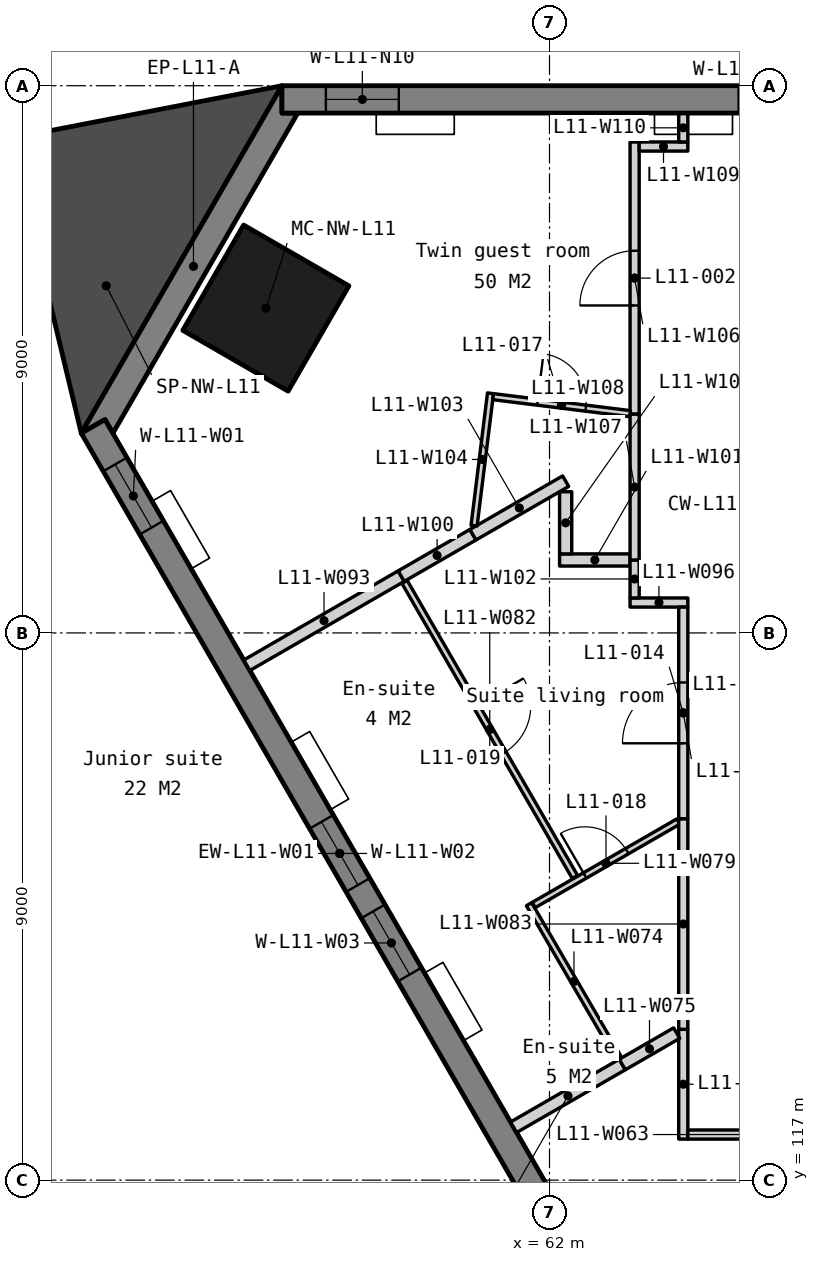
"""IFC4 building model, lengths in metres.
Left out: names, types, materials, properties, quantities, classifications, styles, units other than length and angle.
Written with IfcOpenShell. Run it as: python <this file> out.ifc"""

import sys

from ifc_helpers import new_model, si_unit, direction, frame, frame_2d, origin, origin_2d, place, context, subcontext, project, spatial, polyline, rectangle, outline, extrude, element, fill, save


model = new_model("IFC4")
c1 = context("Model", 3, precision=1e-05, world=origin(), true_north=direction((0.0, 1.0)))
c2 = subcontext(c1, "Body", "Model", "MODEL_VIEW")
j1 = project(units=[si_unit("LENGTHUNIT", "METRE"), si_unit("PLANEANGLEUNIT", "RADIAN")], contexts=[c1])
p1 = place(None, origin())
s1 = spatial("IfcSite", under=j1, at=p1, CompositionType="ELEMENT")
p2 = place(p1, origin())
s2 = spatial("IfcBuilding", under=s1, at=p2, CompositionType="ELEMENT")
p3 = place(p2, frame((0.0, 0.0, 52.5)))
s3 = spatial("IfcBuildingStorey", under=s2, at=p3, CompositionType="ELEMENT", Elevation=52.5)
p4 = place(p3, frame((57.336, 131.342, 0.0), z_axis=(0.0, 0.0, 1.0), x_axis=(-0.5, -0.866025403784, 0.0)))
e1 = element("IfcColumn", 1, at=p4, inside=s3, PredefinedType="COLUMN", context=c2, shape_type="SweptSolid", body=[
    extrude(rectangle(XDim=2.0, YDim=2.0, at=origin_2d()), origin(), (0.0, 0.0, 1.0), 3.5),
])
p5 = place(p3, frame((0.0, 0.0, -0.15)))
e2 = element("IfcWall", 2, at=p5, inside=s3, PredefinedType="SOLIDWALL", context=c2, shape_type="SweptSolid", body=[
    extrude(outline(polyline([(57.6, 135.0), (57.6, 134.55), (57.86, 134.55), (54.82, 129.284), (54.69, 129.509), (54.3, 129.284), (57.6, 135.0)])), origin(), (0.0, 0.0, 1.0), 3.5),
])
p6 = place(p3, frame((102.4, 134.775, -0.15), z_axis=(0.0, 0.0, 1.0), x_axis=(-1.0, 0.0, 0.0)))
e3 = element("IfcWall", 3, at=p6, inside=s3, PredefinedType="SOLIDWALL", context=c2, shape_type="SweptSolid", body=[
    extrude(outline(polyline([(44.8, 0.0), (44.8, 3.5), (0.0, 3.5), (0.0, 0.0), (44.8, 0.0)])), frame((0.0, 0.225, 0.0), z_axis=(0.0, -1.0, 0.0), x_axis=(1.0, 0.0, 0.0)), (0.0, 0.0, 1.0), 0.45),
])
p7 = place(p6, frame((0.722, 0.0, 1.05)))
e4 = element("IfcOpeningElement", 4, at=p7, cuts=e3, PredefinedType="OPENING", context=c2, shape_type="SweptSolid", body=[
    extrude(rectangle(XDim=1.2, YDim=1.5, at=frame_2d((0.6, 0.75))), frame((0.0, 0.235, 0.0), z_axis=(0.0, -1.0, 0.0), x_axis=(1.0, 0.0, 0.0)), (0.0, 0.0, 1.0), 0.47),
])
p8 = place(p6, frame((7.51, 0.0, 1.05)))
e5 = element("IfcOpeningElement", 5, at=p8, cuts=e3, PredefinedType="OPENING", context=c2, shape_type="SweptSolid", body=[
    extrude(rectangle(XDim=1.2, YDim=1.5, at=frame_2d((0.6, 0.75))), frame((0.0, 0.235, 0.0), z_axis=(0.0, -1.0, 0.0), x_axis=(1.0, 0.0, 0.0)), (0.0, 0.0, 1.0), 0.47),
])
p9 = place(p6, frame((9.21, 0.0, 1.05)))
e6 = element("IfcOpeningElement", 6, at=p9, cuts=e3, PredefinedType="OPENING", context=c2, shape_type="SweptSolid", body=[
    extrude(rectangle(XDim=1.2, YDim=1.5, at=frame_2d((0.6, 0.75))), frame((0.0, 0.235, 0.0), z_axis=(0.0, -1.0, 0.0), x_axis=(1.0, 0.0, 0.0)), (0.0, 0.0, 1.0), 0.47),
])
p10 = place(p6, frame((16.47, 0.0, 1.05)))
e7 = element("IfcOpeningElement", 7, at=p10, cuts=e3, PredefinedType="OPENING", context=c2, shape_type="SweptSolid", body=[
    extrude(rectangle(XDim=1.2, YDim=1.5, at=frame_2d((0.6, 0.75))), frame((0.0, 0.235, 0.0), z_axis=(0.0, -1.0, 0.0), x_axis=(1.0, 0.0, 0.0)), (0.0, 0.0, 1.0), 0.47),
])
p11 = place(p6, frame((18.17, 0.0, 1.05)))
e8 = element("IfcOpeningElement", 8, at=p11, cuts=e3, PredefinedType="OPENING", context=c2, shape_type="SweptSolid", body=[
    extrude(rectangle(XDim=1.2, YDim=1.5, at=frame_2d((0.6, 0.75))), frame((0.0, 0.235, 0.0), z_axis=(0.0, -1.0, 0.0), x_axis=(1.0, 0.0, 0.0)), (0.0, 0.0, 1.0), 0.47),
])
p12 = place(p6, frame((25.43, 0.0, 1.05)))
e9 = element("IfcOpeningElement", 9, at=p12, cuts=e3, PredefinedType="OPENING", context=c2, shape_type="SweptSolid", body=[
    extrude(rectangle(XDim=1.2, YDim=1.5, at=frame_2d((0.6, 0.75))), frame((0.0, 0.235, 0.0), z_axis=(0.0, -1.0, 0.0), x_axis=(1.0, 0.0, 0.0)), (0.0, 0.0, 1.0), 0.47),
])
p13 = place(p6, frame((27.13, 0.0, 1.05)))
e10 = element("IfcOpeningElement", 10, at=p13, cuts=e3, PredefinedType="OPENING", context=c2, shape_type="SweptSolid", body=[
    extrude(rectangle(XDim=1.2, YDim=1.5, at=frame_2d((0.6, 0.75))), frame((0.0, 0.235, 0.0), z_axis=(0.0, -1.0, 0.0), x_axis=(1.0, 0.0, 0.0)), (0.0, 0.0, 1.0), 0.47),
])
p14 = place(p6, frame((34.39, 0.0, 1.05)))
e11 = element("IfcOpeningElement", 11, at=p14, cuts=e3, PredefinedType="OPENING", context=c2, shape_type="SweptSolid", body=[
    extrude(rectangle(XDim=1.2, YDim=1.5, at=frame_2d((0.6, 0.75))), frame((0.0, 0.235, 0.0), z_axis=(0.0, -1.0, 0.0), x_axis=(1.0, 0.0, 0.0)), (0.0, 0.0, 1.0), 0.47),
])
p15 = place(p6, frame((36.09, 0.0, 1.05)))
e12 = element("IfcOpeningElement", 12, at=p15, cuts=e3, PredefinedType="OPENING", context=c2, shape_type="SweptSolid", body=[
    extrude(rectangle(XDim=1.2, YDim=1.5, at=frame_2d((0.6, 0.75))), frame((0.0, 0.235, 0.0), z_axis=(0.0, -1.0, 0.0), x_axis=(1.0, 0.0, 0.0)), (0.0, 0.0, 1.0), 0.47),
])
p16 = place(p6, frame((42.878, 0.0, 1.05)))
e13 = element("IfcOpeningElement", 13, at=p16, cuts=e3, PredefinedType="OPENING", context=c2, shape_type="SweptSolid", body=[
    extrude(rectangle(XDim=1.2, YDim=1.5, at=frame_2d((0.6, 0.75))), frame((0.0, 0.235, 0.0), z_axis=(0.0, -1.0, 0.0), x_axis=(1.0, 0.0, 0.0)), (0.0, 0.0, 1.0), 0.47),
])
p17 = place(p3, frame((54.495, 129.397, -0.15), z_axis=(0.0, 0.0, 1.0), x_axis=(0.499995201193, -0.866028174359, 0.0)))
e14 = element("IfcWall", 14, at=p17, inside=s3, PredefinedType="SOLIDWALL", context=c2, shape_type="SweptSolid", body=[
    extrude(outline(polyline([(0.0, 0.0), (0.0, 3.5), (16.22, 3.5), (16.22, 0.0), (0.0, 0.0)])), frame((0.0, 0.225, 0.0), z_axis=(0.0, -1.0, 0.0), x_axis=(1.0, 0.0, 0.0)), (0.0, 0.0, 1.0), 0.45),
])
p18 = place(p17, frame((0.722, 0.0, 1.05)))
e15 = element("IfcOpeningElement", 15, at=p18, cuts=e14, PredefinedType="OPENING", context=c2, shape_type="SweptSolid", body=[
    extrude(rectangle(XDim=1.2, YDim=1.5, at=frame_2d((0.6, 0.75))), frame((0.0, 0.235, 0.0), z_axis=(0.0, -1.0, 0.0), x_axis=(1.0, 0.0, 0.0)), (0.0, 0.0, 1.0), 0.47),
])
p19 = place(p17, frame((7.51, 0.0, 1.05)))
e16 = element("IfcOpeningElement", 16, at=p19, cuts=e14, PredefinedType="OPENING", context=c2, shape_type="SweptSolid", body=[
    extrude(rectangle(XDim=1.2, YDim=1.5, at=frame_2d((0.6, 0.75))), frame((0.0, 0.235, 0.0), z_axis=(0.0, -1.0, 0.0), x_axis=(1.0, 0.0, 0.0)), (0.0, 0.0, 1.0), 0.47),
])
p20 = place(p17, frame((9.21, 0.0, 1.05)))
e17 = element("IfcOpeningElement", 17, at=p20, cuts=e14, PredefinedType="OPENING", context=c2, shape_type="SweptSolid", body=[
    extrude(rectangle(XDim=1.2, YDim=1.5, at=frame_2d((0.6, 0.75))), frame((0.0, 0.235, 0.0), z_axis=(0.0, -1.0, 0.0), x_axis=(1.0, 0.0, 0.0)), (0.0, 0.0, 1.0), 0.47),
])
p21 = place(p3, frame((62.522, 115.042, 0.0), z_axis=(0.0, 0.0, 1.0), x_axis=(0.866047669374, 0.499961432884, 0.0)))
e18 = element("IfcWall", 18, at=p21, inside=s3, PredefinedType="SOLIDWALL", context=c2, shape_type="SweptSolid", body=[
    extrude(rectangle(XDim=3.95, YDim=0.45, at=frame_2d((1.975, 0.0))), origin(), (0.0, 0.0, 1.0), 6.85),
])
p22 = place(p3, frame((0.0, 0.0, -0.15)))
e19 = element("IfcWall", 19, at=p22, inside=s3, PredefinedType="SOLIDWALL", context=c2, shape_type="SweptSolid", body=[
    extrude(outline(polyline([(57.6, 135.0), (53.137, 134.135), (54.3, 129.284), (57.6, 135.0)])), origin(), (0.0, 0.0, 1.0), 3.5),
])
p23 = place(p3, frame((64.2, 117.675, 0.0), z_axis=(0.0, 0.0, 1.0), x_axis=(0.0, 1.0, 0.0)))
e20 = element("IfcWall", 20, at=p23, inside=s3, PredefinedType="PARTITIONING", context=c2, shape_type="SweptSolid", body=[
    extrude(rectangle(XDim=1.806, YDim=0.15, at=frame_2d((0.903, 0.0))), origin(), (0.0, 0.0, 1.0), 3.35),
])
p24 = place(p3, frame((64.275, 117.75, 0.0), z_axis=(0.0, 0.0, 1.0), x_axis=(1.0, 0.0, 0.0)))
e21 = element("IfcWall", 21, at=p24, inside=s3, PredefinedType="PARTITIONING", context=c2, shape_type="SweptSolid", body=[
    extrude(rectangle(XDim=5.691, YDim=0.15, at=frame_2d((2.846, 0.0))), origin(), (0.0, 0.0, 1.0), 2.938),
])
p25 = place(p24, frame((2.396, 0.0, 0.0)))
e22 = element("IfcOpeningElement", 22, at=p25, cuts=e21, PredefinedType="OPENING", context=c2, shape_type="SweptSolid", body=[
    extrude(rectangle(XDim=0.9, YDim=2.1, at=frame_2d((0.45, 1.05))), frame((0.0, 0.085, 0.0), z_axis=(0.0, -1.0, 0.0), x_axis=(1.0, 0.0, 0.0)), (0.0, 0.0, 1.0), 0.17),
])
p26 = place(p3, frame((61.41, 117.87, 0.0), z_axis=(0.0, 0.0, 1.0), x_axis=(0.86604377311, 0.499968182045, 0.0)))
e23 = element("IfcWall", 23, at=p26, inside=s3, PredefinedType="PARTITIONING", context=c2, shape_type="SweptSolid", body=[
    extrude(rectangle(XDim=2.064, YDim=0.2, at=frame_2d((1.032, 0.0))), origin(), (0.0, 0.0, 1.0), 3.35),
])
p27 = place(p3, frame((61.663, 121.538, 0.0), z_axis=(0.0, 0.0, 1.0), x_axis=(0.502884554521, -0.864353587847, 0.0)))
e24 = element("IfcWall", 24, at=p27, inside=s3, PredefinedType="PARTITIONING", context=c2, shape_type="SweptSolid", body=[
    extrude(rectangle(XDim=2.94, YDim=0.1, at=frame_2d((1.47, 0.0))), origin(), (0.0, 0.0, 1.0), 3.35),
])
p28 = place(p3, frame((63.197, 118.902, 0.0), z_axis=(0.0, 0.0, 1.0), x_axis=(0.866067506982, 0.499927068031, 0.0)))
e25 = element("IfcWall", 25, at=p28, inside=s3, PredefinedType="PARTITIONING", context=c2, shape_type="SweptSolid", body=[
    extrude(rectangle(XDim=1.033, YDim=0.2, at=frame_2d((0.517, 0.0))), origin(), (0.0, 0.0, 1.0), 3.35),
])
p29 = place(p3, frame((61.74, 121.525, 0.0), z_axis=(0.0, 0.0, 1.0), x_axis=(0.866012292785, 0.50002270823, 0.0)))
e26 = element("IfcWall", 26, at=p29, inside=s3, PredefinedType="PARTITIONING", context=c2, shape_type="SweptSolid", body=[
    extrude(rectangle(XDim=2.745, YDim=0.1, at=frame_2d((1.373, 0.0))), origin(), (0.0, 0.0, 1.0), 3.35),
])
p30 = place(p29, frame((0.972, 0.0, 0.0)))
e27 = element("IfcOpeningElement", 27, at=p30, cuts=e26, PredefinedType="OPENING", context=c2, shape_type="SweptSolid", body=[
    extrude(rectangle(XDim=0.8, YDim=2.1, at=frame_2d((0.4, 1.05))), frame((0.0, 0.06, 0.0), z_axis=(0.0, -1.0, 0.0), x_axis=(1.0, 0.0, 0.0)), (0.0, 0.0, 1.0), 0.12),
])
p31 = place(p3, frame((59.616, 126.839, 0.0), z_axis=(0.0, 0.0, 1.0), x_axis=(0.499995229588, -0.866028157966, 0.0)))
e28 = element("IfcWall", 28, at=p31, inside=s3, PredefinedType="PARTITIONING", context=c2, shape_type="SweptSolid", body=[
    extrude(rectangle(XDim=5.604, YDim=0.1, at=frame_2d((2.802, 0.0))), origin(), (0.0, 0.0, 1.0), 3.35),
])
p32 = place(p31, frame((2.352, 0.0, 0.0)))
e29 = element("IfcOpeningElement", 29, at=p32, cuts=e28, PredefinedType="OPENING", context=c2, shape_type="SweptSolid", body=[
    extrude(rectangle(XDim=0.9, YDim=2.1, at=frame_2d((0.45, 1.05))), frame((0.0, 0.06, 0.0), z_axis=(0.0, -1.0, 0.0), x_axis=(1.0, 0.0, 0.0)), (0.0, 0.0, 1.0), 0.12),
])
p33 = place(p3, frame((64.2, 119.481, 0.0), z_axis=(0.0, 0.0, 1.0), x_axis=(0.0, 1.0, 0.0)))
e30 = element("IfcWall", 30, at=p33, inside=s3, PredefinedType="PARTITIONING", context=c2, shape_type="SweptSolid", body=[
    extrude(rectangle(XDim=3.464, YDim=0.15, at=frame_2d((1.732, 0.0))), origin(), (0.0, 0.0, 1.0), 3.35),
])
p34 = place(p3, frame((57.023, 125.469, 0.0), z_axis=(0.0, 0.0, 1.0), x_axis=(0.866020551717, 0.500008403934, 0.0)))
e31 = element("IfcWall", 31, at=p34, inside=s3, PredefinedType="PARTITIONING", context=c2, shape_type="SweptSolid", body=[
    extrude(rectangle(XDim=2.932, YDim=0.2, at=frame_2d((1.466, 0.0))), origin(), (0.0, 0.0, 1.0), 3.35),
])
p35 = place(p3, frame((63.325, 126.5, 0.0), z_axis=(0.0, 0.0, 1.0), x_axis=(1.0, 0.0, 0.0)))
e32 = element("IfcWall", 32, at=p35, inside=s3, PredefinedType="PARTITIONING", context=c2, shape_type="SweptSolid", body=[
    extrude(rectangle(XDim=0.95, YDim=0.15, at=frame_2d((0.475, 0.0))), origin(), (0.0, 0.0, 1.0), 3.35),
])
p36 = place(p3, frame((64.2, 122.945, 0.0), z_axis=(0.0, 0.0, 1.0), x_axis=(0.0, 1.0, 0.0)))
e33 = element("IfcWall", 33, at=p36, inside=s3, PredefinedType="PARTITIONING", context=c2, shape_type="SweptSolid", body=[
    extrude(rectangle(XDim=3.48, YDim=0.15, at=frame_2d((1.74, 0.0))), origin(), (0.0, 0.0, 1.0), 3.35),
])
p37 = place(p36, frame((1.24, 0.0, 0.0)))
e34 = element("IfcOpeningElement", 34, at=p37, cuts=e33, PredefinedType="OPENING", context=c2, shape_type="SweptSolid", body=[
    extrude(rectangle(XDim=1.0, YDim=2.1, at=frame_2d((0.5, 1.05))), frame((0.0, 0.085, 0.0), z_axis=(0.0, -1.0, 0.0), x_axis=(1.0, 0.0, 0.0)), (0.0, 0.0, 1.0), 0.17),
])
p38 = place(p3, frame((59.562, 126.934, 0.0), z_axis=(0.0, 0.0, 1.0), x_axis=(0.86603930999, 0.499975912971, 0.0)))
e35 = element("IfcWall", 35, at=p38, inside=s3, PredefinedType="PARTITIONING", context=c2, shape_type="SweptSolid", body=[
    extrude(rectangle(XDim=1.362, YDim=0.2, at=frame_2d((0.681, 0.0))), origin(), (0.0, 0.0, 1.0), 3.35),
])
p39 = place(p3, frame((62.166, 127.2, 0.0), z_axis=(0.0, 0.0, 1.0), x_axis=(1.0, 0.0, 0.0)))
e36 = element("IfcWall", 36, at=p39, inside=s3, PredefinedType="PARTITIONING", context=c2, shape_type="SweptSolid", body=[
    extrude(rectangle(XDim=1.159, YDim=0.2, at=frame_2d((0.58, 0.0))), origin(), (0.0, 0.0, 1.0), 3.35),
])
p40 = place(p3, frame((63.4, 126.575, 0.0), z_axis=(0.0, 0.0, 1.0), x_axis=(0.0, 1.0, 0.0)))
e37 = element("IfcWall", 37, at=p40, inside=s3, PredefinedType="PARTITIONING", context=c2, shape_type="SweptSolid", body=[
    extrude(rectangle(XDim=0.625, YDim=0.15, at=frame_2d((0.312, 0.0))), origin(), (0.0, 0.0, 1.0), 3.35),
])
p41 = place(p3, frame((60.741, 127.615, 0.0), z_axis=(0.0, 0.0, 1.0), x_axis=(0.866033195618, 0.499986503906, 0.0)))
e38 = element("IfcWall", 38, at=p41, inside=s3, PredefinedType="PARTITIONING", context=c2, shape_type="SweptSolid", body=[
    extrude(rectangle(XDim=1.761, YDim=0.2, at=frame_2d((0.88, 0.0))), origin(), (0.0, 0.0, 1.0), 3.35),
])
p42 = place(p3, frame((60.76, 127.764, 0.0), z_axis=(0.0, 0.0, 1.0), x_axis=(0.123171944878, 0.992385344508, 0.0)))
e39 = element("IfcWall", 39, at=p42, inside=s3, PredefinedType="PARTITIONING", context=c2, shape_type="SweptSolid", body=[
    extrude(rectangle(XDim=2.194, YDim=0.1, at=frame_2d((1.097, 0.0))), origin(), (0.0, 0.0, 1.0), 3.35),
])
p43 = place(p3, frame((62.266, 127.3, 0.0), z_axis=(0.0, 0.0, 1.0), x_axis=(0.0, 1.0, 0.0)))
e40 = element("IfcWall", 40, at=p43, inside=s3, PredefinedType="PARTITIONING", context=c2, shape_type="SweptSolid", body=[
    extrude(rectangle(XDim=1.022, YDim=0.2, at=frame_2d((0.511, 0.0))), origin(), (0.0, 0.0, 1.0), 3.35),
])
p44 = place(p3, frame((63.4, 129.597, 0.0), z_axis=(0.0, 0.0, 1.0), x_axis=(0.0, 1.0, 0.0)))
e41 = element("IfcWall", 41, at=p44, inside=s3, PredefinedType="PARTITIONING", context=c2, shape_type="SweptSolid", body=[
    extrude(rectangle(XDim=4.477, YDim=0.15, at=frame_2d((2.239, 0.0))), origin(), (0.0, 0.0, 1.0), 3.35),
])
p45 = place(p44, frame((1.789, 0.0, 0.0)))
e42 = element("IfcOpeningElement", 42, at=p45, cuts=e41, PredefinedType="OPENING", context=c2, shape_type="SweptSolid", body=[
    extrude(rectangle(XDim=0.9, YDim=2.1, at=frame_2d((0.45, 1.05))), frame((0.0, 0.085, 0.0), z_axis=(0.0, -1.0, 0.0), x_axis=(1.0, 0.0, 0.0)), (0.0, 0.0, 1.0), 0.17),
])
p46 = place(p3, frame((63.4, 127.2, 0.0), z_axis=(0.0, 0.0, 1.0), x_axis=(0.0, 1.0, 0.0)))
e43 = element("IfcWall", 43, at=p46, inside=s3, PredefinedType="PARTITIONING", context=c2, shape_type="SweptSolid", body=[
    extrude(rectangle(XDim=2.397, YDim=0.15, at=frame_2d((1.199, 0.0))), origin(), (0.0, 0.0, 1.0), 3.35),
])
p47 = place(p3, frame((61.073, 129.886, 0.0), z_axis=(0.0, 0.0, 1.0), x_axis=(0.992399852351, -0.123055000118, 0.0)))
e44 = element("IfcWall", 44, at=p47, inside=s3, PredefinedType="PARTITIONING", context=c2, shape_type="SweptSolid", body=[
    extrude(rectangle(XDim=2.27, YDim=0.1, at=frame_2d((1.135, 0.0))), origin(), (0.0, 0.0, 1.0), 3.35),
])
p48 = place(p47, frame((0.735, 0.0, 0.0)))
e45 = element("IfcOpeningElement", 45, at=p48, cuts=e44, PredefinedType="OPENING", context=c2, shape_type="SweptSolid", body=[
    extrude(rectangle(XDim=0.8, YDim=2.1, at=frame_2d((0.4, 1.05))), frame((0.0, 0.06, 0.0), z_axis=(0.0, -1.0, 0.0), x_axis=(1.0, 0.0, 0.0)), (0.0, 0.0, 1.0), 0.12),
])
p49 = place(p3, frame((63.475, 134.0, 0.0), z_axis=(0.0, 0.0, 1.0), x_axis=(0.999999813645, 0.000610500497, 0.0)))
e46 = element("IfcWall", 46, at=p49, inside=s3, PredefinedType="PARTITIONING", context=c2, shape_type="SweptSolid", body=[
    extrude(rectangle(XDim=0.8, YDim=0.15, at=frame_2d((0.4, 0.0))), origin(), (0.0, 0.0, 1.0), 2.887),
])
p50 = place(p3, frame((64.2, 134.075, 0.0), z_axis=(0.0, 0.0, 1.0), x_axis=(0.0, 1.0, 0.0)))
e47 = element("IfcWall", 47, at=p50, inside=s3, PredefinedType="PARTITIONING", context=c2, shape_type="SweptSolid", body=[
    extrude(rectangle(XDim=0.465, YDim=0.15, at=frame_2d((0.232, 0.0))), origin(), (0.0, 0.0, 1.0), 3.35),
])
p51 = place(p15, origin())
e48 = element("IfcWindow", 48, at=p51, inside=s3, PartitioningType="SINGLE_PANEL", PredefinedType="WINDOW", context=c2, shape_type="SweptSolid", body=[
    extrude(rectangle(XDim=1.2, YDim=1.5, at=frame_2d((0.6, 0.75))), frame((0.0, 0.03, 0.0), z_axis=(0.0, -1.0, 0.0), x_axis=(1.0, 0.0, 0.0)), (0.0, 0.0, 1.0), 0.06),
])
fill(e12, e48)
p52 = place(p16, origin())
e49 = element("IfcWindow", 49, at=p52, inside=s3, PartitioningType="SINGLE_PANEL", PredefinedType="WINDOW", context=c2, shape_type="SweptSolid", body=[
    extrude(rectangle(XDim=1.2, YDim=1.5, at=frame_2d((0.6, 0.75))), frame((0.0, 0.03, 0.0), z_axis=(0.0, -1.0, 0.0), x_axis=(1.0, 0.0, 0.0)), (0.0, 0.0, 1.0), 0.06),
])
fill(e13, e49)
p53 = place(p18, origin())
e50 = element("IfcWindow", 50, at=p53, inside=s3, PartitioningType="SINGLE_PANEL", PredefinedType="WINDOW", context=c2, shape_type="SweptSolid", body=[
    extrude(rectangle(XDim=1.2, YDim=1.5, at=frame_2d((0.6, 0.75))), frame((0.0, 0.03, 0.0), z_axis=(0.0, -1.0, 0.0), x_axis=(1.0, 0.0, 0.0)), (0.0, 0.0, 1.0), 0.06),
])
fill(e15, e50)
p54 = place(p19, origin())
e51 = element("IfcWindow", 51, at=p54, inside=s3, PartitioningType="SINGLE_PANEL", PredefinedType="WINDOW", context=c2, shape_type="SweptSolid", body=[
    extrude(rectangle(XDim=1.2, YDim=1.5, at=frame_2d((0.6, 0.75))), frame((0.0, 0.03, 0.0), z_axis=(0.0, -1.0, 0.0), x_axis=(1.0, 0.0, 0.0)), (0.0, 0.0, 1.0), 0.06),
])
fill(e16, e51)
p55 = place(p20, origin())
e52 = element("IfcWindow", 52, at=p55, inside=s3, PartitioningType="SINGLE_PANEL", PredefinedType="WINDOW", context=c2, shape_type="SweptSolid", body=[
    extrude(rectangle(XDim=1.2, YDim=1.5, at=frame_2d((0.6, 0.75))), frame((0.0, 0.03, 0.0), z_axis=(0.0, -1.0, 0.0), x_axis=(1.0, 0.0, 0.0)), (0.0, 0.0, 1.0), 0.06),
])
fill(e17, e52)
p56 = place(p45, origin())
e53 = element("IfcDoor", 53, at=p56, inside=s3, OperationType="SINGLE_SWING_LEFT", PredefinedType="DOOR", context=c2, shape_type="SweptSolid", body=[
    extrude(rectangle(XDim=0.9, YDim=2.1, at=frame_2d((0.45, 1.05))), frame((0.0, 0.025, 0.0), z_axis=(0.0, -1.0, 0.0), x_axis=(1.0, 0.0, 0.0)), (0.0, 0.0, 1.0), 0.05),
])
fill(e42, e53)
p57 = place(p37, origin())
e54 = element("IfcDoor", 54, at=p57, inside=s3, OperationType="SINGLE_SWING_LEFT", PredefinedType="DOOR", context=c2, shape_type="SweptSolid", body=[
    extrude(rectangle(XDim=1.0, YDim=2.1, at=frame_2d((0.5, 1.05))), frame((0.0, 0.025, 0.0), z_axis=(0.0, -1.0, 0.0), x_axis=(1.0, 0.0, 0.0)), (0.0, 0.0, 1.0), 0.05),
])
fill(e34, e54)
p58 = place(p48, origin())
e55 = element("IfcDoor", 55, at=p58, inside=s3, OperationType="SINGLE_SWING_LEFT", PredefinedType="DOOR", context=c2, shape_type="SweptSolid", body=[
    extrude(rectangle(XDim=0.8, YDim=2.1, at=frame_2d((0.4, 1.05))), frame((0.0, 0.025, 0.0), z_axis=(0.0, -1.0, 0.0), x_axis=(1.0, 0.0, 0.0)), (0.0, 0.0, 1.0), 0.05),
])
fill(e45, e55)
p59 = place(p30, origin())
e56 = element("IfcDoor", 56, at=p59, inside=s3, OperationType="SINGLE_SWING_LEFT", PredefinedType="DOOR", context=c2, shape_type="SweptSolid", body=[
    extrude(rectangle(XDim=0.8, YDim=2.1, at=frame_2d((0.4, 1.05))), frame((0.0, 0.025, 0.0), z_axis=(0.0, -1.0, 0.0), x_axis=(1.0, 0.0, 0.0)), (0.0, 0.0, 1.0), 0.05),
])
fill(e27, e56)
p60 = place(p32, origin())
e57 = element("IfcDoor", 57, at=p60, inside=s3, OperationType="SINGLE_SWING_LEFT", PredefinedType="DOOR", context=c2, shape_type="SweptSolid", body=[
    extrude(rectangle(XDim=0.9, YDim=2.1, at=frame_2d((0.45, 1.05))), frame((0.0, 0.025, 0.0), z_axis=(0.0, -1.0, 0.0), x_axis=(1.0, 0.0, 0.0)), (0.0, 0.0, 1.0), 0.05),
])
fill(e29, e57)
save(model, sys.argv[1])
